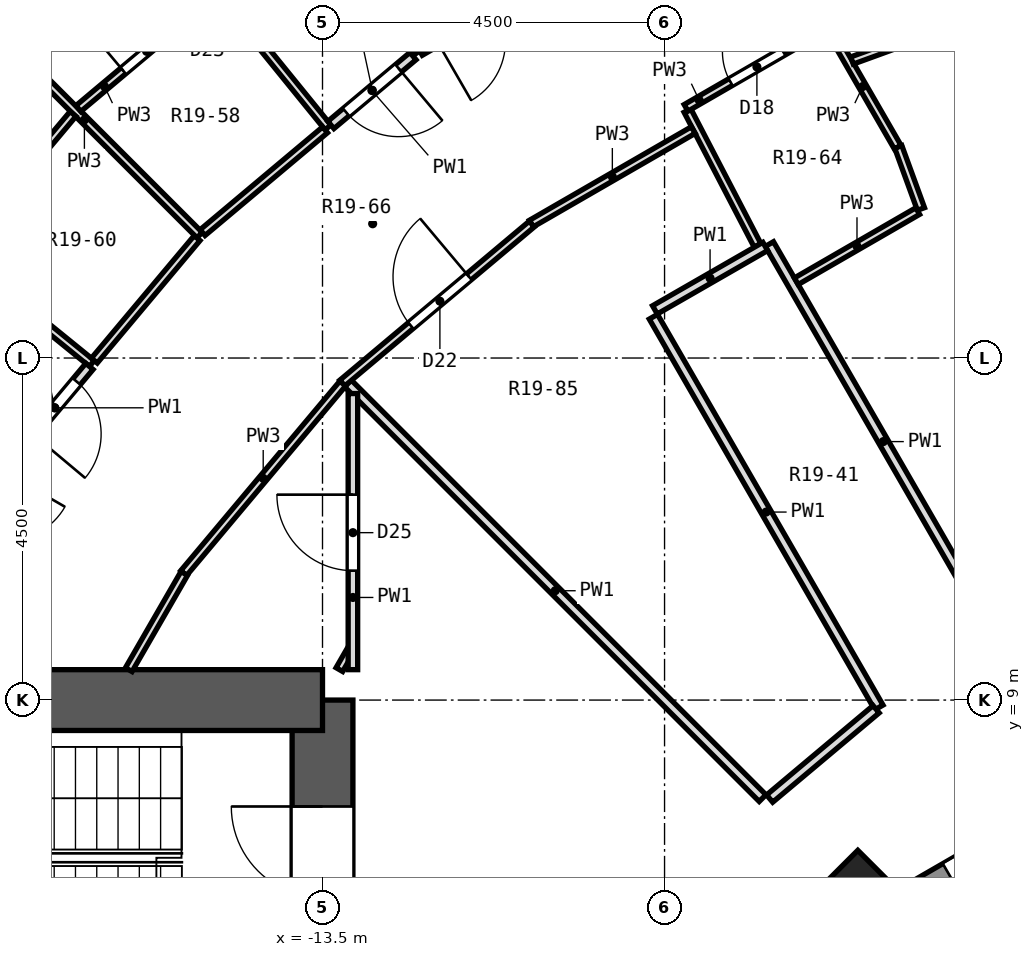
"""IFC4 building model, lengths in metres.
Left out: names, types, materials, properties, quantities, classifications, styles, units other than length and angle.
Written with IfcOpenShell. Run it as: python <this file> out.ifc"""

import sys

from ifc_helpers import new_model, si_unit, direction, frame, frame_2d, origin, origin_2d, place, context, subcontext, project, spatial, rectangle, extrude, element, fill, save


model = new_model("IFC4")
c1 = context("Model", 3, precision=1e-05, world=origin(), true_north=direction((0.0, 1.0)))
c2 = subcontext(c1, "Body", "Model", "MODEL_VIEW")
j1 = project(units=[si_unit("LENGTHUNIT", "METRE"), si_unit("PLANEANGLEUNIT", "RADIAN")], contexts=[c1])
p1 = place(None, origin())
s1 = spatial("IfcSite", under=j1, at=p1, CompositionType="ELEMENT")
p2 = place(p1, origin())
s2 = spatial("IfcBuilding", under=s1, at=p2, CompositionType="ELEMENT")
p3 = place(p2, frame((0.0, 0.0, 111.7)))
s3 = spatial("IfcBuildingStorey", under=s2, at=p3, CompositionType="ELEMENT", Elevation=111.7)
p4 = place(p3, frame((-6.458, 6.458, 0.0), z_axis=(0.0, 0.0, 1.0), x_axis=(-0.707106781187, 0.707106781187, 0.0)))
e1 = element("IfcColumn", 1, at=p4, inside=s3, PredefinedType="COLUMN", context=c2, shape_type="SweptSolid", body=[
    extrude(rectangle(XDim=0.8, YDim=0.8, at=origin_2d()), origin(), (0.0, 0.0, 1.0), 3.3),
])
p5 = place(p3, frame((-13.5, -9.0, 0.0), z_axis=(0.0, 0.0, 1.0), x_axis=(0.0, 1.0, 0.0)))
e2 = element("IfcWall", 2, at=p5, inside=s3, PredefinedType="SHEAR", context=c2, shape_type="SweptSolid", body=[
    extrude(rectangle(XDim=18.0, YDim=0.8, at=frame_2d((9.0, 0.0))), origin(), (0.0, 0.0, 1.0), 3.3),
])
p6 = place(p5, frame((15.4, 0.0, 0.0)))
e3 = element("IfcOpeningElement", 3, at=p6, cuts=e2, PredefinedType="OPENING", context=c2, shape_type="SweptSolid", body=[
    extrude(rectangle(XDim=1.2, YDim=2.1, at=frame_2d((0.6, 1.05))), frame((0.0, 0.412, 0.0), z_axis=(0.0, -1.0, 0.0), x_axis=(1.0, 0.0, 0.0)), (0.0, 0.0, 1.0), 0.824),
])
p7 = place(p5, frame((1.4, 0.0, 0.0)))
e4 = element("IfcOpeningElement", 4, at=p7, cuts=e2, PredefinedType="OPENING", context=c2, shape_type="SweptSolid", body=[
    extrude(rectangle(XDim=1.2, YDim=2.1, at=frame_2d((0.6, 1.05))), frame((0.0, 0.412, 0.0), z_axis=(0.0, -1.0, 0.0), x_axis=(1.0, 0.0, 0.0)), (0.0, 0.0, 1.0), 0.824),
])
p8 = place(p5, frame((7.5, 0.0, 0.0)))
e5 = element("IfcOpeningElement", 5, at=p8, cuts=e2, PredefinedType="OPENING", context=c2, shape_type="SweptSolid", body=[
    extrude(rectangle(XDim=3.0, YDim=2.4, at=frame_2d((1.5, 1.2))), frame((0.0, 0.412, 0.0), z_axis=(0.0, -1.0, 0.0), x_axis=(1.0, 0.0, 0.0)), (0.0, 0.0, 1.0), 0.824),
])
p9 = place(p3, frame((-13.5, 9.0, 0.0), z_axis=(0.0, 0.0, 1.0), x_axis=(-1.0, 0.0, 0.0)))
e6 = element("IfcWall", 6, at=p9, inside=s3, PredefinedType="SHEAR", context=c2, shape_type="SweptSolid", body=[
    extrude(rectangle(XDim=10.4, YDim=0.8, at=frame_2d((5.2, 0.0))), origin(), (0.0, 0.0, 1.0), 3.3),
])
p10 = place(p3, frame((-2.527, 8.125, 0.0), z_axis=(0.0, 0.0, 1.0), x_axis=(-0.86604563398, -0.499964958637, 0.0)))
e7 = element("IfcWall", 7, at=p10, inside=s3, PredefinedType="SOLIDWALL", context=c2, shape_type="SweptSolid", body=[
    extrude(rectangle(XDim=3.747, YDim=0.6, at=frame_2d((1.874, 0.0))), origin(), (0.0, 0.0, 1.0), 2.8),
])
p11 = place(p10, frame((0.674, 0.0, 0.9)))
e8 = element("IfcOpeningElement", 8, at=p11, cuts=e7, PredefinedType="OPENING", context=c2, shape_type="SweptSolid", body=[
    extrude(rectangle(XDim=2.4, YDim=1.8, at=frame_2d((1.2, 0.9))), frame((0.0, 0.312, 0.0), z_axis=(0.0, -1.0, 0.0), x_axis=(1.0, 0.0, 0.0)), (0.0, 0.0, 1.0), 0.624),
])
p12 = place(p3, frame((-5.925, 16.279, 0.0), z_axis=(0.0, 0.0, 1.0), x_axis=(0.3425983225, -0.939481979295, 0.0)))
e9 = element("IfcWall", 9, at=p12, inside=s3, PredefinedType="PARTITIONING", context=c2, shape_type="SweptSolid", body=[
    extrude(rectangle(XDim=0.871, YDim=0.1, at=frame_2d((0.436, 0.0))), origin(), (0.0, 0.0, 1.0), 2.8),
])
p13 = place(p3, frame((-8.699, 16.756, 0.0), z_axis=(0.0, 0.0, 1.0), x_axis=(0.461029785453, -0.887384661195, 0.0)))
e10 = element("IfcWall", 10, at=p13, inside=s3, PredefinedType="PARTITIONING", context=c2, shape_type="SweptSolid", body=[
    extrude(rectangle(XDim=2.0, YDim=0.1, at=frame_2d((1.0, 0.0))), origin(), (0.0, 0.0, 1.0), 2.8),
])
p14 = place(p3, frame((-9.147, 14.043, 0.0), z_axis=(0.0, 0.0, 1.0), x_axis=(0.499891007886, -0.866088321267, 0.0)))
e11 = element("IfcWall", 11, at=p14, inside=s3, PredefinedType="PARTITIONING", context=c2, shape_type="SweptSolid", body=[
    extrude(rectangle(XDim=5.935, YDim=0.125, at=frame_2d((2.967, 0.0))), origin(), (0.0, 0.0, 1.0), 2.8),
])
p15 = place(p3, frame((-7.621, 14.999, 0.0), z_axis=(0.0, 0.0, 1.0), x_axis=(0.499745940409, -0.866172035478, 0.0)))
e12 = element("IfcWall", 12, at=p15, inside=s3, PredefinedType="PARTITIONING", context=c2, shape_type="SweptSolid", body=[
    extrude(rectangle(XDim=5.999, YDim=0.125, at=frame_2d((3.0, 0.0))), origin(), (0.0, 0.0, 1.0), 2.8),
])
p16 = place(p3, frame((-6.853, 17.868, 0.0), z_axis=(0.0, 0.0, 1.0), x_axis=(0.499963655964, -0.866046386007, 0.0)))
e13 = element("IfcWall", 13, at=p16, inside=s3, PredefinedType="PARTITIONING", context=c2, shape_type="SweptSolid", body=[
    extrude(rectangle(XDim=1.84, YDim=0.1, at=frame_2d((0.92, 0.0))), origin(), (0.0, 0.0, 1.0), 2.8),
])
p17 = place(p3, frame((-14.721, 21.024, 0.0), z_axis=(0.0, 0.0, 1.0), x_axis=(0.573546429028, -0.819173054824, 0.0)))
e14 = element("IfcWall", 14, at=p17, inside=s3, PredefinedType="PARTITIONING", context=c2, shape_type="SweptSolid", body=[
    extrude(rectangle(XDim=4.287, YDim=0.1, at=frame_2d((2.144, 0.0))), origin(), (0.0, 0.0, 1.0), 2.8),
])
p18 = place(p3, frame((-14.878, 18.32, 0.0), z_axis=(0.0, 0.0, 1.0), x_axis=(0.630256971768, -0.776386597989, 0.0)))
e15 = element("IfcWall", 15, at=p18, inside=s3, PredefinedType="PARTITIONING", context=c2, shape_type="SweptSolid", body=[
    extrude(rectangle(XDim=2.301, YDim=0.1, at=frame_2d((1.15, 0.0))), origin(), (0.0, 0.0, 1.0), 2.8),
])
p19 = place(p3, frame((-18.148, 18.148, 0.0), z_axis=(0.0, 0.0, 1.0), x_axis=(0.707106781187, -0.707106781187, 0.0)))
e16 = element("IfcWall", 16, at=p19, inside=s3, PredefinedType="PARTITIONING", context=c2, shape_type="SweptSolid", body=[
    extrude(rectangle(XDim=4.286, YDim=0.1, at=frame_2d((2.143, 0.0))), origin(), (0.0, 0.0, 1.0), 2.8),
])
p20 = place(p3, frame((-13.167, 13.167, 0.0), z_axis=(0.0, 0.0, 1.0), x_axis=(0.707106781187, -0.707106781187, 0.0)))
e17 = element("IfcWall", 17, at=p20, inside=s3, PredefinedType="PARTITIONING", context=c2, shape_type="SweptSolid", body=[
    extrude(rectangle(XDim=7.716, YDim=0.125, at=frame_2d((3.858, 0.0))), origin(), (0.0, 0.0, 1.0), 2.8),
])
p21 = place(p3, frame((-18.32, 14.878, 0.0), z_axis=(0.0, 0.0, 1.0), x_axis=(0.776386597989, -0.630256971768, 0.0)))
e18 = element("IfcWall", 18, at=p21, inside=s3, PredefinedType="PARTITIONING", context=c2, shape_type="SweptSolid", body=[
    extrude(rectangle(XDim=2.301, YDim=0.1, at=frame_2d((1.15, 0.0))), origin(), (0.0, 0.0, 1.0), 2.8),
])
p22 = place(p3, frame((-6.534, 17.414, 0.0), z_axis=(0.0, 0.0, 1.0), x_axis=(0.93961928365, 0.342221568275, 0.0)))
e19 = element("IfcWall", 19, at=p22, inside=s3, PredefinedType="PARTITIONING", context=c2, shape_type="SweptSolid", body=[
    extrude(rectangle(XDim=1.761, YDim=0.1, at=frame_2d((0.881, 0.0))), origin(), (0.0, 0.0, 1.0), 2.8),
])
p23 = place(p3, frame((-9.127, 14.134, 0.0), z_axis=(0.0, 0.0, 1.0), x_axis=(0.866992941954, 0.498320417604, 0.0)))
e20 = element("IfcWall", 20, at=p23, inside=s3, PredefinedType="PARTITIONING", context=c2, shape_type="SweptSolid", body=[
    extrude(rectangle(XDim=1.674, YDim=0.125, at=frame_2d((0.837, 0.0))), origin(), (0.0, 0.0, 1.0), 2.8),
])
p24 = place(p3, frame((-7.267, 14.51, 0.0), z_axis=(0.0, 0.0, 1.0), x_axis=(0.865945322787, 0.500138678712, 0.0)))
e21 = element("IfcWall", 21, at=p24, inside=s3, PredefinedType="PARTITIONING", context=c2, shape_type="SweptSolid", body=[
    extrude(rectangle(XDim=1.845, YDim=0.1, at=frame_2d((0.922, 0.0))), origin(), (0.0, 0.0, 1.0), 2.8),
])
p25 = place(p3, frame((-10.753, 15.269, 0.0), z_axis=(0.0, 0.0, 1.0), x_axis=(0.866079862983, 0.499905662036, 0.0)))
e22 = element("IfcWall", 22, at=p25, inside=s3, PredefinedType="PARTITIONING", context=c2, shape_type="SweptSolid", body=[
    extrude(rectangle(XDim=2.461, YDim=0.1, at=frame_2d((1.23, 0.0))), origin(), (0.0, 0.0, 1.0), 2.8),
])
p26 = place(p3, frame((-8.717, 16.791, 0.0), z_axis=(0.0, 0.0, 1.0), x_axis=(0.865866191869, 0.50027566179, 0.0)))
e23 = element("IfcWall", 23, at=p26, inside=s3, PredefinedType="PARTITIONING", context=c2, shape_type="SweptSolid", body=[
    extrude(rectangle(XDim=2.101, YDim=0.1, at=frame_2d((1.05, 0.0))), origin(), (0.0, 0.0, 1.0), 2.8),
])
p27 = place(p26, frame((0.677, 0.0, 0.0)))
e24 = element("IfcOpeningElement", 24, at=p27, cuts=e23, PredefinedType="OPENING", context=c2, shape_type="SweptSolid", body=[
    extrude(rectangle(XDim=0.8, YDim=2.1, at=frame_2d((0.4, 1.05))), frame((0.0, 0.062, 0.0), z_axis=(0.0, -1.0, 0.0), x_axis=(1.0, 0.0, 0.0)), (0.0, 0.0, 1.0), 0.124),
])
p28 = place(p3, frame((-12.219, 17.537, 0.0), z_axis=(0.0, 0.0, 1.0), x_axis=(0.866036909293, 0.499980071345, 0.0)))
e25 = element("IfcWall", 25, at=p28, inside=s3, PredefinedType="PARTITIONING", context=c2, shape_type="SweptSolid", body=[
    extrude(rectangle(XDim=1.422, YDim=0.125, at=frame_2d((0.711, 0.0))), origin(), (0.0, 0.0, 1.0), 2.8),
])
p29 = place(p28, frame((0.261, 0.0, 0.0)))
e26 = element("IfcOpeningElement", 26, at=p29, cuts=e25, PredefinedType="OPENING", context=c2, shape_type="SweptSolid", body=[
    extrude(rectangle(XDim=0.9, YDim=2.1, at=frame_2d((0.45, 1.05))), frame((0.0, 0.074, 0.0), z_axis=(0.0, -1.0, 0.0), x_axis=(1.0, 0.0, 0.0)), (0.0, 0.0, 1.0), 0.149),
])
p30 = place(p3, frame((-7.617, 7.704, 0.0), z_axis=(0.0, 0.0, 1.0), x_axis=(0.7660388271, 0.642794302538, 0.0)))
e27 = element("IfcWall", 27, at=p30, inside=s3, PredefinedType="PARTITIONING", context=c2, shape_type="SweptSolid", body=[
    extrude(rectangle(XDim=1.828, YDim=0.125, at=frame_2d((0.914, 0.0))), origin(), (0.0, 0.0, 1.0), 2.8),
])
p31 = place(p3, frame((-13.241, 13.169, 0.0), z_axis=(0.0, 0.0, 1.0), x_axis=(0.766028328168, 0.642806814248, 0.0)))
e28 = element("IfcWall", 28, at=p31, inside=s3, PredefinedType="PARTITIONING", context=c2, shape_type="SweptSolid", body=[
    extrude(rectangle(XDim=3.255, YDim=0.1, at=frame_2d((1.628, 0.0))), origin(), (0.0, 0.0, 1.0), 2.8),
])
p32 = place(p31, frame((1.178, 0.0, 0.0)))
e29 = element("IfcOpeningElement", 29, at=p32, cuts=e28, PredefinedType="OPENING", context=c2, shape_type="SweptSolid", body=[
    extrude(rectangle(XDim=1.0, YDim=2.1, at=frame_2d((0.5, 1.05))), frame((0.0, 0.062, 0.0), z_axis=(0.0, -1.0, 0.0), x_axis=(1.0, 0.0, 0.0)), (0.0, 0.0, 1.0), 0.124),
])
p33 = place(p3, frame((-15.078, 15.15, 0.0), z_axis=(0.0, 0.0, 1.0), x_axis=(0.766047733122, 0.642783688793, 0.0)))
e30 = element("IfcWall", 30, at=p33, inside=s3, PredefinedType="PARTITIONING", context=c2, shape_type="SweptSolid", body=[
    extrude(rectangle(XDim=2.104, YDim=0.1, at=frame_2d((1.052, 0.0))), origin(), (0.0, 0.0, 1.0), 2.8),
])
p34 = place(p3, frame((-13.39, 16.566, 0.0), z_axis=(0.0, 0.0, 1.0), x_axis=(0.766158527395, 0.642651624833, 0.0)))
e31 = element("IfcWall", 31, at=p34, inside=s3, PredefinedType="PARTITIONING", context=c2, shape_type="SweptSolid", body=[
    extrude(rectangle(XDim=1.409, YDim=0.125, at=frame_2d((0.705, 0.0))), origin(), (0.0, 0.0, 1.0), 2.8),
])
p35 = place(p34, frame((0.261, 0.0, 0.0)))
e32 = element("IfcOpeningElement", 32, at=p35, cuts=e31, PredefinedType="OPENING", context=c2, shape_type="SweptSolid", body=[
    extrude(rectangle(XDim=0.9, YDim=2.1, at=frame_2d((0.45, 1.05))), frame((0.0, 0.074, 0.0), z_axis=(0.0, -1.0, 0.0), x_axis=(1.0, 0.0, 0.0)), (0.0, 0.0, 1.0), 0.149),
])
p36 = place(p3, frame((-16.712, 16.782, 0.0), z_axis=(0.0, 0.0, 1.0), x_axis=(0.766236222747, 0.642558986359, 0.0)))
e33 = element("IfcWall", 33, at=p36, inside=s3, PredefinedType="PARTITIONING", context=c2, shape_type="SweptSolid", body=[
    extrude(rectangle(XDim=2.343, YDim=0.1, at=frame_2d((1.172, 0.0))), origin(), (0.0, 0.0, 1.0), 2.8),
])
p37 = place(p36, frame((0.771, 0.0, 0.0)))
e34 = element("IfcOpeningElement", 34, at=p37, cuts=e33, PredefinedType="OPENING", context=c2, shape_type="SweptSolid", body=[
    extrude(rectangle(XDim=0.8, YDim=2.1, at=frame_2d((0.4, 1.05))), frame((0.0, 0.062, 0.0), z_axis=(0.0, -1.0, 0.0), x_axis=(1.0, 0.0, 0.0)), (0.0, 0.0, 1.0), 0.124),
])
p38 = place(p3, frame((-15.327, 10.67, 0.0), z_axis=(0.0, 0.0, 1.0), x_axis=(0.642806814248, 0.766028328168, 0.0)))
e35 = element("IfcWall", 35, at=p38, inside=s3, PredefinedType="PARTITIONING", context=c2, shape_type="SweptSolid", body=[
    extrude(rectangle(XDim=3.255, YDim=0.1, at=frame_2d((1.628, 0.0))), origin(), (0.0, 0.0, 1.0), 2.8),
])
p39 = place(p3, frame((-16.502, 13.466, 0.0), z_axis=(0.0, 0.0, 1.0), x_axis=(0.642783688793, 0.766047733122, 0.0)))
e36 = element("IfcWall", 36, at=p39, inside=s3, PredefinedType="PARTITIONING", context=c2, shape_type="SweptSolid", body=[
    extrude(rectangle(XDim=2.104, YDim=0.1, at=frame_2d((1.052, 0.0))), origin(), (0.0, 0.0, 1.0), 2.8),
])
p40 = place(p3, frame((-17.48, 12.3, 0.0), z_axis=(0.0, 0.0, 1.0), x_axis=(0.642680541645, 0.766134271124, 0.0)))
e37 = element("IfcWall", 37, at=p40, inside=s3, PredefinedType="PARTITIONING", context=c2, shape_type="SweptSolid", body=[
    extrude(rectangle(XDim=1.422, YDim=0.125, at=frame_2d((0.711, 0.0))), origin(), (0.0, 0.0, 1.0), 2.8),
])
p41 = place(p40, frame((0.261, 0.0, 0.0)))
e38 = element("IfcOpeningElement", 38, at=p41, cuts=e37, PredefinedType="OPENING", context=c2, shape_type="SweptSolid", body=[
    extrude(rectangle(XDim=0.9, YDim=2.1, at=frame_2d((0.45, 1.05))), frame((0.0, 0.074, 0.0), z_axis=(0.0, -1.0, 0.0), x_axis=(1.0, 0.0, 0.0)), (0.0, 0.0, 1.0), 0.149),
])
p42 = place(p3, frame((-18.288, 14.916, 0.0), z_axis=(0.0, 0.0, 1.0), x_axis=(0.642558986359, 0.766236222747, 0.0)))
e39 = element("IfcWall", 39, at=p42, inside=s3, PredefinedType="PARTITIONING", context=c2, shape_type="SweptSolid", body=[
    extrude(rectangle(XDim=2.343, YDim=0.1, at=frame_2d((1.172, 0.0))), origin(), (0.0, 0.0, 1.0), 2.8),
])
p43 = place(p42, frame((0.771, 0.0, 0.0)))
e40 = element("IfcOpeningElement", 40, at=p43, cuts=e39, PredefinedType="OPENING", context=c2, shape_type="SweptSolid", body=[
    extrude(rectangle(XDim=0.8, YDim=2.1, at=frame_2d((0.4, 1.05))), frame((0.0, 0.062, 0.0), z_axis=(0.0, -1.0, 0.0), x_axis=(1.0, 0.0, 0.0)), (0.0, 0.0, 1.0), 0.124),
])
p44 = place(p3, frame((-16.049, 9.4, 0.0), z_axis=(0.0, 0.0, 1.0), x_axis=(0.499553700297, 0.866282921752, 0.0)))
e41 = element("IfcWall", 41, at=p44, inside=s3, PredefinedType="PARTITIONING", context=c2, shape_type="SweptSolid", body=[
    extrude(rectangle(XDim=1.461, YDim=0.1, at=frame_2d((0.73, 0.0))), origin(), (0.0, 0.0, 1.0), 2.8),
])
p45 = place(p3, frame((-13.278, 9.401, 0.0), z_axis=(0.0, 0.0, 1.0), x_axis=(0.49953088146, 0.866296080141, 0.0)))
e42 = element("IfcWall", 42, at=p45, inside=s3, PredefinedType="PARTITIONING", context=c2, shape_type="SweptSolid", body=[
    extrude(rectangle(XDim=0.294, YDim=0.1, at=frame_2d((0.147, 0.0))), origin(), (0.0, 0.0, 1.0), 2.8),
])
p46 = place(p3, frame((-13.1, 9.4, 0.0), z_axis=(0.0, 0.0, 1.0), x_axis=(0.0, 1.0, 0.0)))
e43 = element("IfcWall", 43, at=p46, inside=s3, PredefinedType="PARTITIONING", context=c2, shape_type="SweptSolid", body=[
    extrude(rectangle(XDim=3.633, YDim=0.125, at=frame_2d((1.816, 0.0))), origin(), (0.0, 0.0, 1.0), 2.8),
])
p47 = place(p46, frame((1.302, 0.0, 0.0)))
e44 = element("IfcOpeningElement", 44, at=p47, cuts=e43, PredefinedType="OPENING", context=c2, shape_type="SweptSolid", body=[
    extrude(rectangle(XDim=1.0, YDim=2.1, at=frame_2d((0.5, 1.05))), frame((0.0, 0.074, 0.0), z_axis=(0.0, -1.0, 0.0), x_axis=(1.0, 0.0, 0.0)), (0.0, 0.0, 1.0), 0.149),
])
p48 = place(p11, origin())
e45 = element("IfcWindow", 45, at=p48, inside=s3, PartitioningType="SINGLE_PANEL", PredefinedType="WINDOW", context=c2, shape_type="SweptSolid", body=[
    extrude(rectangle(XDim=2.4, YDim=1.8, at=frame_2d((1.2, 0.9))), frame((0.0, -0.12, 0.0), z_axis=(0.0, -1.0, 0.0), x_axis=(1.0, 0.0, 0.0)), (0.0, 0.0, 1.0), 0.06),
])
fill(e8, e45)
p49 = place(p27, origin())
e46 = element("IfcDoor", 46, at=p49, inside=s3, OperationType="SINGLE_SWING_RIGHT", PredefinedType="DOOR", context=c2, shape_type="SweptSolid", body=[
    extrude(rectangle(XDim=0.8, YDim=2.1, at=frame_2d((0.4, 1.05))), frame((0.0, 0.025, 0.0), z_axis=(0.0, -1.0, 0.0), x_axis=(1.0, 0.0, 0.0)), (0.0, 0.0, 1.0), 0.05),
])
fill(e24, e46)
p50 = place(p35, frame((0.9, 0.0, 0.0), z_axis=(0.0, 0.0, 1.0), x_axis=(-1.0, 0.0, 0.0)))
e47 = element("IfcDoor", 47, at=p50, inside=s3, OperationType="SINGLE_SWING_LEFT", PredefinedType="DOOR", context=c2, shape_type="SweptSolid", body=[
    extrude(rectangle(XDim=0.9, YDim=2.1, at=frame_2d((0.45, 1.05))), frame((0.0, 0.025, 0.0), z_axis=(0.0, -1.0, 0.0), x_axis=(1.0, 0.0, 0.0)), (0.0, 0.0, 1.0), 0.05),
])
fill(e32, e47)
p51 = place(p32, origin())
e48 = element("IfcDoor", 48, at=p51, inside=s3, OperationType="SINGLE_SWING_RIGHT", PredefinedType="DOOR", context=c2, shape_type="SweptSolid", body=[
    extrude(rectangle(XDim=1.0, YDim=2.1, at=frame_2d((0.5, 1.05))), frame((0.0, 0.025, 0.0), z_axis=(0.0, -1.0, 0.0), x_axis=(1.0, 0.0, 0.0)), (0.0, 0.0, 1.0), 0.05),
])
fill(e29, e48)
p52 = place(p37, origin())
e49 = element("IfcDoor", 49, at=p52, inside=s3, OperationType="SINGLE_SWING_LEFT", PredefinedType="DOOR", context=c2, shape_type="SweptSolid", body=[
    extrude(rectangle(XDim=0.8, YDim=2.1, at=frame_2d((0.4, 1.05))), frame((0.0, 0.025, 0.0), z_axis=(0.0, -1.0, 0.0), x_axis=(1.0, 0.0, 0.0)), (0.0, 0.0, 1.0), 0.05),
])
fill(e34, e49)
p53 = place(p47, origin())
e50 = element("IfcDoor", 50, at=p53, inside=s3, OperationType="SINGLE_SWING_RIGHT", PredefinedType="DOOR", context=c2, shape_type="SweptSolid", body=[
    extrude(rectangle(XDim=1.0, YDim=2.1, at=frame_2d((0.5, 1.05))), frame((0.0, 0.025, 0.0), z_axis=(0.0, -1.0, 0.0), x_axis=(1.0, 0.0, 0.0)), (0.0, 0.0, 1.0), 0.05),
])
fill(e44, e50)
p54 = place(p41, frame((0.9, 0.0, 0.0), z_axis=(0.0, 0.0, 1.0), x_axis=(-1.0, 0.0, 0.0)))
e51 = element("IfcDoor", 51, at=p54, inside=s3, OperationType="SINGLE_SWING_RIGHT", PredefinedType="DOOR", context=c2, shape_type="SweptSolid", body=[
    extrude(rectangle(XDim=0.9, YDim=2.1, at=frame_2d((0.45, 1.05))), frame((0.0, 0.025, 0.0), z_axis=(0.0, -1.0, 0.0), x_axis=(1.0, 0.0, 0.0)), (0.0, 0.0, 1.0), 0.05),
])
fill(e38, e51)
p55 = place(p6, origin())
e52 = element("IfcDoor", 52, at=p55, inside=s3, OperationType="SINGLE_SWING_RIGHT", PredefinedType="DOOR", context=c2, shape_type="SweptSolid", body=[
    extrude(rectangle(XDim=1.2, YDim=2.1, at=frame_2d((0.6, 1.05))), frame((0.0, 0.025, 0.0), z_axis=(0.0, -1.0, 0.0), x_axis=(1.0, 0.0, 0.0)), (0.0, 0.0, 1.0), 0.05),
])
fill(e3, e52)
save(model, sys.argv[1])
